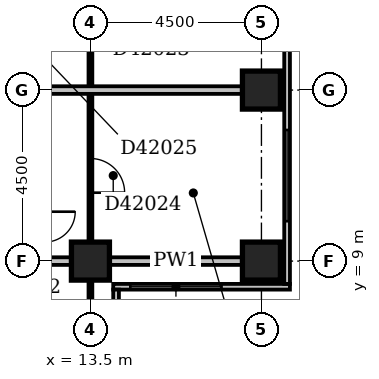
"""IFC4 building model, lengths in metres.
Left out: names, types, materials, properties, quantities, classifications, styles, units other than length and angle.
Written with IfcOpenShell. Run it as: python <this file> out.ifc"""

import sys

from ifc_helpers import new_model, si_unit, direction, frame, frame_2d, origin, origin_2d, place, context, subcontext, project, spatial, rectangle, extrude, element, fill, save


model = new_model("IFC4")
c1 = context("Model", 3, precision=1e-05, world=origin(), true_north=direction((0.0, 1.0)))
c2 = subcontext(c1, "Body", "Model", "MODEL_VIEW")
j1 = project(units=[si_unit("LENGTHUNIT", "METRE"), si_unit("PLANEANGLEUNIT", "RADIAN")], contexts=[c1])
p1 = place(None, origin())
s1 = spatial("IfcSite", under=j1, at=p1, CompositionType="ELEMENT")
p2 = place(p1, origin())
s2 = spatial("IfcBuilding", under=s1, at=p2, CompositionType="ELEMENT")
p3 = place(p2, frame((0.0, 0.0, 166.4)))
s3 = spatial("IfcBuildingStorey", under=s2, at=p3, CompositionType="ELEMENT", Elevation=166.4)
for number, where, z_axis, x_axis in (
    (1, (13.5, 9.0, -0.3), (0.0, 0.0, 1.0), (1.0, 0.0, 0.0)),
    (2, (18.0, 9.0, -0.3), (0.0, 0.0, 1.0), (1.0, 0.0, 0.0)),
    (3, (18.0, 13.5, -0.3), (0.0, 0.0, 1.0), (1.0, 0.0, 0.0)),
):
    element("IfcColumn", number, at=place(p3, frame(where, z_axis=z_axis, x_axis=x_axis)), inside=s3, PredefinedType="COLUMN", context=c2, shape_type="SweptSolid", body=[
        extrude(rectangle(XDim=1.0, YDim=1.0, at=origin_2d()), origin(), (0.0, 0.0, 1.0), 3.6),
    ])
p4 = place(p3, frame((14.175, 3.9, 0.0), z_axis=(0.0, 0.0, 1.0), x_axis=(0.0, 1.0, 0.0)))
e4 = element("IfcWall", 4, at=p4, inside=s3, PredefinedType="STANDARD", context=c2, shape_type="SweptSolid", body=[
    extrude(rectangle(XDim=4.35, YDim=0.15, at=frame_2d((2.175, 0.0))), origin(), (0.0, 0.0, 1.0), 2.7),
])
p5 = place(p4, frame((1.65, 0.0, 0.6)))
e5 = element("IfcOpeningElement", 5, at=p5, cuts=e4, PredefinedType="OPENING", context=c2, shape_type="SweptSolid", body=[
    extrude(rectangle(XDim=2.4, YDim=1.8, at=frame_2d((1.2, 0.9))), frame((0.0, 0.087, 0.0), z_axis=(0.0, -1.0, 0.0), x_axis=(1.0, 0.0, 0.0)), (0.0, 0.0, 1.0), 0.174),
])
p6 = place(p3, frame((14.1, 8.325, 0.0), z_axis=(0.0, 0.0, 1.0), x_axis=(1.0, 0.0, 0.0)))
e6 = element("IfcWall", 6, at=p6, inside=s3, PredefinedType="STANDARD", context=c2, shape_type="SweptSolid", body=[
    extrude(rectangle(XDim=4.65, YDim=0.15, at=frame_2d((2.325, 0.0))), origin(), (0.0, 0.0, 1.0), 2.7),
])
p7 = place(p6, frame((0.45, 0.0, 0.6)))
e7 = element("IfcOpeningElement", 7, at=p7, cuts=e6, PredefinedType="OPENING", context=c2, shape_type="SweptSolid", body=[
    extrude(rectangle(XDim=2.4, YDim=1.8, at=frame_2d((1.2, 0.9))), frame((0.0, 0.087, 0.0), z_axis=(0.0, -1.0, 0.0), x_axis=(1.0, 0.0, 0.0)), (0.0, 0.0, 1.0), 0.174),
])
p8 = place(p3, frame((18.675, 8.4, 0.0), z_axis=(0.0, 0.0, 1.0), x_axis=(0.0, 1.0, 0.0)))
e8 = element("IfcWall", 8, at=p8, inside=s3, PredefinedType="STANDARD", context=c2, shape_type="SweptSolid", body=[
    extrude(rectangle(XDim=8.85, YDim=0.15, at=frame_2d((4.425, 0.0))), origin(), (0.0, 0.0, 1.0), 2.7),
])
p9 = place(p8, frame((1.65, 0.0, 0.6)))
e9 = element("IfcOpeningElement", 9, at=p9, cuts=e8, PredefinedType="OPENING", context=c2, shape_type="SweptSolid", body=[
    extrude(rectangle(XDim=2.4, YDim=1.8, at=frame_2d((1.2, 0.9))), frame((0.0, 0.087, 0.0), z_axis=(0.0, -1.0, 0.0), x_axis=(1.0, 0.0, 0.0)), (0.0, 0.0, 1.0), 0.174),
])
p10 = place(p8, frame((7.36, 0.0, 0.6)))
e10 = element("IfcOpeningElement", 10, at=p10, cuts=e8, PredefinedType="OPENING", context=c2, shape_type="SweptSolid", body=[
    extrude(rectangle(XDim=1.2, YDim=1.8, at=frame_2d((0.6, 0.9))), frame((0.0, 0.087, 0.0), z_axis=(0.0, -1.0, 0.0), x_axis=(1.0, 0.0, 0.0)), (0.0, 0.0, 1.0), 0.174),
])
p11 = place(p3, frame((13.5, 5.0, 0.0), z_axis=(0.0, 0.0, 1.0), x_axis=(0.0, 1.0, 0.0)))
e11 = element("IfcWall", 11, at=p11, inside=s3, PredefinedType="PARTITIONING", context=c2, shape_type="SweptSolid", body=[
    extrude(rectangle(XDim=3.5, YDim=0.1, at=frame_2d((1.75, 0.0))), origin(), (0.0, 0.0, 1.0), 2.7),
])
p12 = place(p3, frame((9.1, 9.0, 0.0), z_axis=(0.0, 0.0, 1.0), x_axis=(1.0, 0.0, 0.0)))
e12 = element("IfcWall", 12, at=p12, inside=s3, PredefinedType="PARTITIONING", context=c2, shape_type="SweptSolid", body=[
    extrude(rectangle(XDim=3.9, YDim=0.2, at=frame_2d((1.95, 0.0))), origin(), (0.0, 0.0, 1.0), 3.3),
])
p13 = place(p3, frame((14.0, 9.0, 0.0), z_axis=(0.0, 0.0, 1.0), x_axis=(1.0, 0.0, 0.0)))
e13 = element("IfcWall", 13, at=p13, inside=s3, PredefinedType="PARTITIONING", context=c2, shape_type="SweptSolid", body=[
    extrude(rectangle(XDim=3.5, YDim=0.2, at=frame_2d((1.75, 0.0))), origin(), (0.0, 0.0, 1.0), 2.7),
])
p14 = place(p3, frame((13.5, 9.5, 0.0), z_axis=(0.0, 0.0, 1.0), x_axis=(0.0, 1.0, 0.0)))
e14 = element("IfcWall", 14, at=p14, inside=s3, PredefinedType="PARTITIONING", context=c2, shape_type="SweptSolid", body=[
    extrude(rectangle(XDim=8.4, YDim=0.1, at=frame_2d((4.2, 0.0))), origin(), (0.0, 0.0, 1.0), 3.3),
])
p15 = place(p14, frame((5.8, 0.0, 0.0)))
e15 = element("IfcOpeningElement", 15, at=p15, cuts=e14, PredefinedType="OPENING", context=c2, shape_type="SweptSolid", body=[
    extrude(rectangle(XDim=0.9, YDim=2.1, at=frame_2d((0.45, 1.05))), frame((0.0, 0.062, 0.0), z_axis=(0.0, -1.0, 0.0), x_axis=(1.0, 0.0, 0.0)), (0.0, 0.0, 1.0), 0.124),
])
p16 = place(p14, frame((1.3, 0.0, 0.0)))
e16 = element("IfcOpeningElement", 16, at=p16, cuts=e14, PredefinedType="OPENING", context=c2, shape_type="SweptSolid", body=[
    extrude(rectangle(XDim=0.9, YDim=2.1, at=frame_2d((0.45, 1.05))), frame((0.0, 0.062, 0.0), z_axis=(0.0, -1.0, 0.0), x_axis=(1.0, 0.0, 0.0)), (0.0, 0.0, 1.0), 0.124),
])
p17 = place(p3, frame((9.1, 13.5, 0.0), z_axis=(0.0, 0.0, 1.0), x_axis=(1.0, 0.0, 0.0)))
e17 = element("IfcWall", 17, at=p17, inside=s3, PredefinedType="PARTITIONING", context=c2, shape_type="SweptSolid", body=[
    extrude(rectangle(XDim=8.4, YDim=0.2, at=frame_2d((4.2, 0.0))), origin(), (0.0, 0.0, 1.0), 3.3),
])
p18 = place(p7, origin())
e18 = element("IfcWindow", 18, at=p18, inside=s3, PartitioningType="SINGLE_PANEL", PredefinedType="WINDOW", context=c2, shape_type="SweptSolid", body=[
    extrude(rectangle(XDim=2.4, YDim=1.8, at=frame_2d((1.2, 0.9))), frame((0.0, 0.03, 0.0), z_axis=(0.0, -1.0, 0.0), x_axis=(1.0, 0.0, 0.0)), (0.0, 0.0, 1.0), 0.06),
])
fill(e7, e18)
p19 = place(p9, origin())
e19 = element("IfcWindow", 19, at=p19, inside=s3, PartitioningType="SINGLE_PANEL", PredefinedType="WINDOW", context=c2, shape_type="SweptSolid", body=[
    extrude(rectangle(XDim=2.4, YDim=1.8, at=frame_2d((1.2, 0.9))), frame((0.0, 0.03, 0.0), z_axis=(0.0, -1.0, 0.0), x_axis=(1.0, 0.0, 0.0)), (0.0, 0.0, 1.0), 0.06),
])
fill(e9, e19)
p20 = place(p16, frame((0.9, 0.0, 0.0), z_axis=(0.0, 0.0, 1.0), x_axis=(-1.0, 0.0, 0.0)))
e20 = element("IfcDoor", 20, at=p20, inside=s3, OperationType="SINGLE_SWING_RIGHT", PredefinedType="DOOR", context=c2, shape_type="SweptSolid", body=[
    extrude(rectangle(XDim=0.9, YDim=2.1, at=frame_2d((0.45, 1.05))), frame((0.0, 0.025, 0.0), z_axis=(0.0, -1.0, 0.0), x_axis=(1.0, 0.0, 0.0)), (0.0, 0.0, 1.0), 0.05),
])
fill(e16, e20)
save(model, sys.argv[1])
